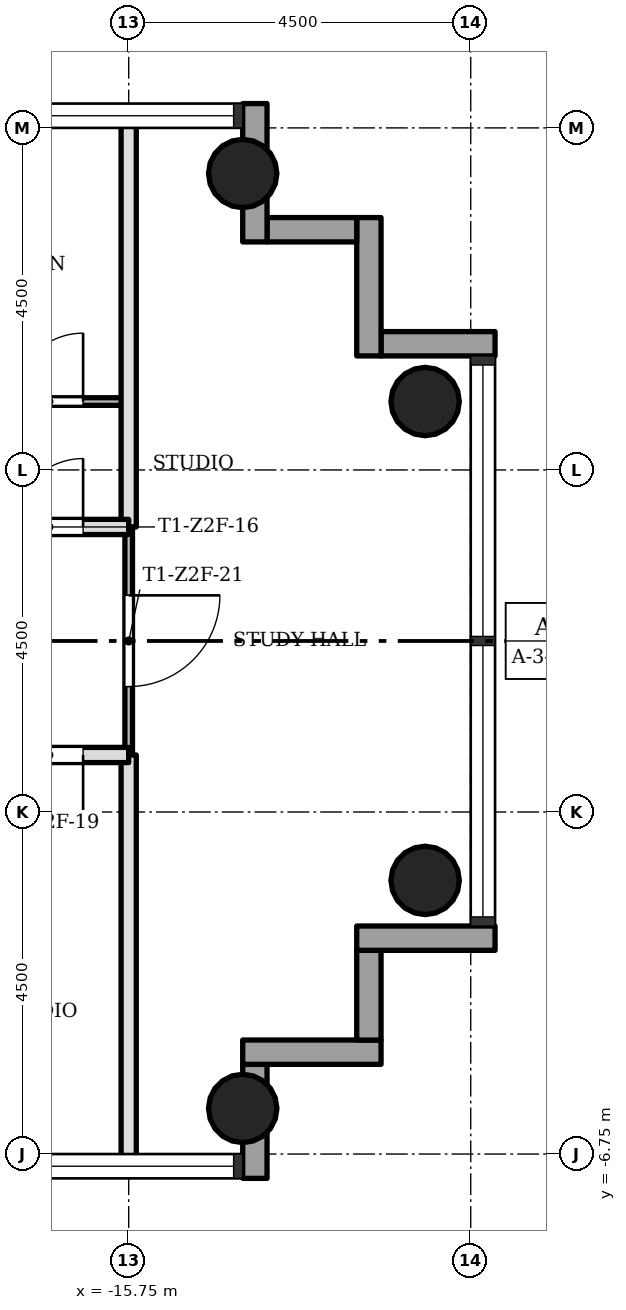
"""IFC4 building model, lengths in metres.
Left out: names, types, materials, properties, quantities, classifications, styles, units other than length and angle.
Written with IfcOpenShell. Run it as: python <this file> out.ifc"""

import sys

from ifc_helpers import new_model, si_unit, direction, frame, frame_2d, origin, origin_2d, place, context, subcontext, project, spatial, rectangle, hollow_circle, extrude, element, fill, save


model = new_model("IFC4")
c1 = context("Model", 3, precision=1e-05, world=origin(), true_north=direction((0.0, 1.0)))
c2 = subcontext(c1, "Body", "Model", "MODEL_VIEW")
j1 = project(units=[si_unit("LENGTHUNIT", "METRE"), si_unit("PLANEANGLEUNIT", "RADIAN")], contexts=[c1])
p1 = place(None, origin())
s1 = spatial("IfcSite", under=j1, at=p1, CompositionType="ELEMENT")
p2 = place(p1, origin())
s2 = spatial("IfcBuilding", under=s1, at=p2, CompositionType="ELEMENT")
p3 = place(p2, frame((0.0, 0.0, 110.6)))
s3 = spatial("IfcBuildingStorey", under=s2, at=p3, CompositionType="ELEMENT", Elevation=110.6)
for number, where, z_axis, x_axis in (
    (1, (-14.25, -6.15, 0.0), (0.0, 0.0, 1.0), (1.0, 0.0, 0.0)),
    (2, (-14.25, 6.15, 0.0), (0.0, 0.0, 1.0), (1.0, 0.0, 0.0)),
    (3, (-11.85, -3.15, 0.0), (0.0, 0.0, 1.0), (1.0, 0.0, 0.0)),
    (4, (-11.85, 3.15, 0.0), (0.0, 0.0, 1.0), (1.0, 0.0, 0.0)),
):
    element("IfcColumn", number, at=place(p3, frame(where, z_axis=z_axis, x_axis=x_axis)), inside=s3, PredefinedType="COLUMN", context=c2, shape_type="SweptSolid", body=[
        extrude(hollow_circle(Radius=0.45, WallThickness=0.032, at=origin_2d()), origin(), (0.0, 0.0, 1.0), 3.4),
    ])
p4 = place(p3, frame((-14.09, -7.07, -0.3), z_axis=(0.0, 0.0, 1.0), x_axis=(0.0, 1.0, 0.0)))
e5 = element("IfcWall", 5, at=p4, inside=s3, PredefinedType="STANDARD", context=c2, shape_type="SweptSolid", body=[
    extrude(rectangle(XDim=1.5, YDim=0.32, at=frame_2d((0.75, 0.0))), origin(), (0.0, 0.0, 1.0), 3.4),
])
p5 = place(p3, frame((-14.25, -5.41, -0.3), z_axis=(0.0, 0.0, 1.0), x_axis=(1.0, 0.0, 0.0)))
e6 = element("IfcWall", 6, at=p5, inside=s3, PredefinedType="STANDARD", context=c2, shape_type="SweptSolid", body=[
    extrude(rectangle(XDim=1.82, YDim=0.32, at=frame_2d((0.91, 0.0))), origin(), (0.0, 0.0, 1.0), 3.4),
])
p6 = place(p3, frame((-12.59, -5.25, -0.3), z_axis=(0.0, 0.0, 1.0), x_axis=(0.0, 1.0, 0.0)))
e7 = element("IfcWall", 7, at=p6, inside=s3, PredefinedType="STANDARD", context=c2, shape_type="SweptSolid", body=[
    extrude(rectangle(XDim=1.18, YDim=0.32, at=frame_2d((0.59, 0.0))), origin(), (0.0, 0.0, 1.0), 3.4),
])
p7 = place(p3, frame((-12.75, -3.91, -0.3), z_axis=(0.0, 0.0, 1.0), x_axis=(1.0, 0.0, 0.0)))
e8 = element("IfcWall", 8, at=p7, inside=s3, PredefinedType="STANDARD", context=c2, shape_type="SweptSolid", body=[
    extrude(rectangle(XDim=1.82, YDim=0.32, at=frame_2d((0.91, 0.0))), origin(), (0.0, 0.0, 1.0), 3.4),
])
p8 = place(p3, frame((-10.93, 3.91, -0.3), z_axis=(0.0, 0.0, 1.0), x_axis=(-1.0, 0.0, 0.0)))
e9 = element("IfcWall", 9, at=p8, inside=s3, PredefinedType="STANDARD", context=c2, shape_type="SweptSolid", body=[
    extrude(rectangle(XDim=1.5, YDim=0.32, at=frame_2d((0.75, 0.0))), origin(), (0.0, 0.0, 1.0), 3.4),
])
p9 = place(p3, frame((-12.59, 3.75, -0.3), z_axis=(0.0, 0.0, 1.0), x_axis=(0.0, 1.0, 0.0)))
e10 = element("IfcWall", 10, at=p9, inside=s3, PredefinedType="STANDARD", context=c2, shape_type="SweptSolid", body=[
    extrude(rectangle(XDim=1.82, YDim=0.32, at=frame_2d((0.91, 0.0))), origin(), (0.0, 0.0, 1.0), 3.4),
])
p10 = place(p3, frame((-12.75, 5.41, -0.3), z_axis=(0.0, 0.0, 1.0), x_axis=(-1.0, 0.0, 0.0)))
e11 = element("IfcWall", 11, at=p10, inside=s3, PredefinedType="STANDARD", context=c2, shape_type="SweptSolid", body=[
    extrude(rectangle(XDim=1.18, YDim=0.32, at=frame_2d((0.59, 0.0))), origin(), (0.0, 0.0, 1.0), 3.4),
])
p11 = place(p3, frame((-14.09, 5.25, -0.3), z_axis=(0.0, 0.0, 1.0), x_axis=(0.0, 1.0, 0.0)))
e12 = element("IfcWall", 12, at=p11, inside=s3, PredefinedType="STANDARD", context=c2, shape_type="SweptSolid", body=[
    extrude(rectangle(XDim=1.82, YDim=0.32, at=frame_2d((0.91, 0.0))), origin(), (0.0, 0.0, 1.0), 3.4),
])
p12 = place(p3, frame((-15.75, -1.5, 0.0), z_axis=(0.0, 0.0, 1.0), x_axis=(0.0, 1.0, 0.0)))
e13 = element("IfcWall", 13, at=p12, inside=s3, PredefinedType="PARTITIONING", context=c2, shape_type="SweptSolid", body=[
    extrude(rectangle(XDim=3.0, YDim=0.1, at=frame_2d((1.5, 0.0))), origin(), (0.0, 0.0, 1.0), 3.0),
])
p13 = place(p12, frame((0.9, 0.0, 0.0)))
e14 = element("IfcOpeningElement", 14, at=p13, cuts=e13, PredefinedType="OPENING", context=c2, shape_type="SweptSolid", body=[
    extrude(rectangle(XDim=1.2, YDim=2.1, at=frame_2d((0.6, 1.05))), frame((0.0, 0.06, 0.0), z_axis=(0.0, -1.0, 0.0), x_axis=(1.0, 0.0, 0.0)), (0.0, 0.0, 1.0), 0.12),
])
for number, where, z_axis, x_axis in (
    (15, (-15.75, -6.85, 0.0), (0.0, 0.0, 1.0), (0.0, 1.0, 0.0)),
    (16, (-15.75, 1.5, 0.0), (0.0, 0.0, 1.0), (0.0, 1.0, 0.0)),
):
    element("IfcWall", number, at=place(p3, frame(where, z_axis=z_axis, x_axis=x_axis)), inside=s3, PredefinedType="SOLIDWALL", context=c2, shape_type="SweptSolid", body=[
        extrude(rectangle(XDim=5.35, YDim=0.2, at=frame_2d((2.675, 0.0))), origin(), (0.0, 0.0, 1.0), 3.0),
    ])
p14 = place(p3, frame((-20.25, -1.5, 0.0), z_axis=(0.0, 0.0, 1.0), x_axis=(1.0, 0.0, 0.0)))
e17 = element("IfcWall", 17, at=p14, inside=s3, PredefinedType="SOLIDWALL", context=c2, shape_type="SweptSolid", body=[
    extrude(rectangle(XDim=4.5, YDim=0.2, at=frame_2d((2.25, 0.0))), origin(), (0.0, 0.0, 1.0), 3.0),
])
p15 = place(p14, frame((3.0, 0.0, 0.0)))
e18 = element("IfcOpeningElement", 18, at=p15, cuts=e17, PredefinedType="OPENING", context=c2, shape_type="SweptSolid", body=[
    extrude(rectangle(XDim=0.9, YDim=2.1, at=frame_2d((0.45, 1.05))), frame((0.0, 0.11, 0.0), z_axis=(0.0, -1.0, 0.0), x_axis=(1.0, 0.0, 0.0)), (0.0, 0.0, 1.0), 0.22),
])
p16 = place(p3, frame((-20.25, 1.5, 0.0), z_axis=(0.0, 0.0, 1.0), x_axis=(1.0, 0.0, 0.0)))
e19 = element("IfcWall", 19, at=p16, inside=s3, PredefinedType="SOLIDWALL", context=c2, shape_type="SweptSolid", body=[
    extrude(rectangle(XDim=4.5, YDim=0.2, at=frame_2d((2.25, 0.0))), origin(), (0.0, 0.0, 1.0), 3.0),
])
p17 = place(p16, frame((3.0, 0.0, 0.0)))
e20 = element("IfcOpeningElement", 20, at=p17, cuts=e19, PredefinedType="OPENING", context=c2, shape_type="SweptSolid", body=[
    extrude(rectangle(XDim=0.9, YDim=2.1, at=frame_2d((0.45, 1.05))), frame((0.0, 0.11, 0.0), z_axis=(0.0, -1.0, 0.0), x_axis=(1.0, 0.0, 0.0)), (0.0, 0.0, 1.0), 0.22),
])
p18 = place(p3, frame((-20.25, 3.15, 0.0), z_axis=(0.0, 0.0, 1.0), x_axis=(1.0, 0.0, 0.0)))
e21 = element("IfcWall", 21, at=p18, inside=s3, PredefinedType="PARTITIONING", context=c2, shape_type="SweptSolid", body=[
    extrude(rectangle(XDim=4.5, YDim=0.1, at=frame_2d((2.25, 0.0))), origin(), (0.0, 0.0, 1.0), 3.0),
])
p19 = place(p18, frame((3.0, 0.0, 0.0)))
e22 = element("IfcOpeningElement", 22, at=p19, cuts=e21, PredefinedType="OPENING", context=c2, shape_type="SweptSolid", body=[
    extrude(rectangle(XDim=0.9, YDim=2.1, at=frame_2d((0.45, 1.05))), frame((0.0, 0.06, 0.0), z_axis=(0.0, -1.0, 0.0), x_axis=(1.0, 0.0, 0.0)), (0.0, 0.0, 1.0), 0.12),
])
p20 = place(p17, origin())
e23 = element("IfcDoor", 23, at=p20, inside=s3, OperationType="SINGLE_SWING_LEFT", PredefinedType="DOOR", context=c2, shape_type="SweptSolid", body=[
    extrude(rectangle(XDim=0.9, YDim=2.1, at=frame_2d((0.45, 1.05))), frame((0.0, 0.025, 0.0), z_axis=(0.0, -1.0, 0.0), x_axis=(1.0, 0.0, 0.0)), (0.0, 0.0, 1.0), 0.05),
])
fill(e20, e23)
p21 = place(p19, origin())
e24 = element("IfcDoor", 24, at=p21, inside=s3, OperationType="SINGLE_SWING_LEFT", PredefinedType="DOOR", context=c2, shape_type="SweptSolid", body=[
    extrude(rectangle(XDim=0.9, YDim=2.1, at=frame_2d((0.45, 1.05))), frame((0.0, 0.025, 0.0), z_axis=(0.0, -1.0, 0.0), x_axis=(1.0, 0.0, 0.0)), (0.0, 0.0, 1.0), 0.05),
])
fill(e22, e24)
p22 = place(p15, origin())
e25 = element("IfcDoor", 25, at=p22, inside=s3, OperationType="SINGLE_SWING_RIGHT", PredefinedType="DOOR", context=c2, shape_type="SweptSolid", body=[
    extrude(rectangle(XDim=0.9, YDim=2.1, at=frame_2d((0.45, 1.05))), frame((0.0, 0.025, 0.0), z_axis=(0.0, -1.0, 0.0), x_axis=(1.0, 0.0, 0.0)), (0.0, 0.0, 1.0), 0.05),
])
fill(e18, e25)
p23 = place(p13, origin())
e26 = element("IfcDoor", 26, at=p23, inside=s3, OperationType="SINGLE_SWING_RIGHT", PredefinedType="DOOR", context=c2, shape_type="SweptSolid", body=[
    extrude(rectangle(XDim=1.2, YDim=2.1, at=frame_2d((0.6, 1.05))), frame((0.0, 0.025, 0.0), z_axis=(0.0, -1.0, 0.0), x_axis=(1.0, 0.0, 0.0)), (0.0, 0.0, 1.0), 0.05),
])
fill(e14, e26)
save(model, sys.argv[1])
